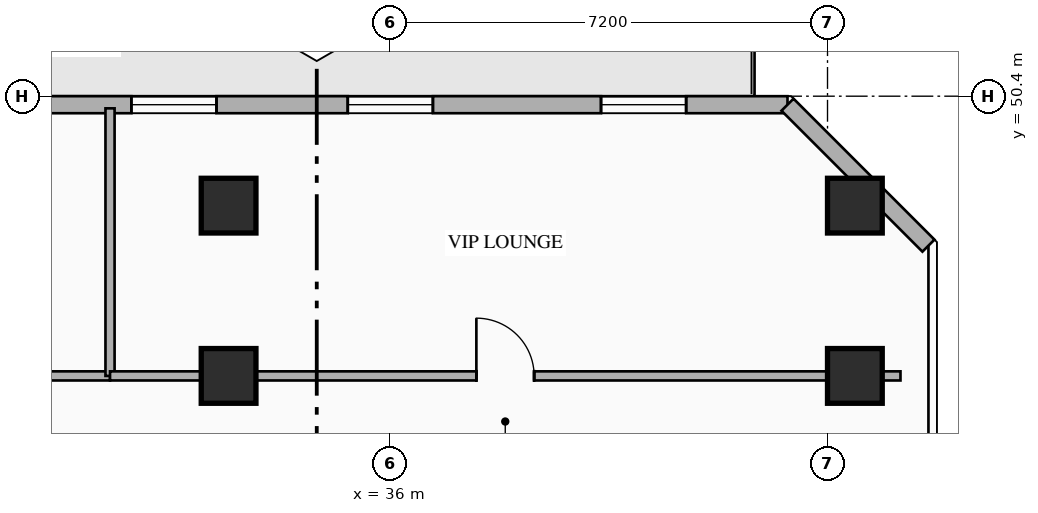
"""IFC4 building model, lengths in metres.
Left out: names, types, materials, properties, quantities, classifications, styles, units other than length and angle.
Written with IfcOpenShell. Run it as: python <this file> out.ifc"""

import sys

from ifc_helpers import new_model, si_unit, direction, frame, frame_2d, origin, origin_2d, place, context, subcontext, project, spatial, rectangle, hollow_rectangle, extrude, element, fill, save


model = new_model("IFC4")
c1 = context("Model", 3, precision=1e-05, world=origin(), true_north=direction((0.0, 1.0)))
c2 = subcontext(c1, "Body", "Model", "MODEL_VIEW")
j1 = project(units=[si_unit("LENGTHUNIT", "METRE"), si_unit("PLANEANGLEUNIT", "RADIAN")], contexts=[c1])
p1 = place(None, origin())
s1 = spatial("IfcSite", under=j1, at=p1, CompositionType="ELEMENT")
p2 = place(p1, origin())
s2 = spatial("IfcBuilding", under=s1, at=p2, CompositionType="ELEMENT")
p3 = place(p2, frame((0.0, 0.0, 70.1)))
s3 = spatial("IfcBuildingStorey", under=s2, at=p3, CompositionType="ELEMENT", Elevation=70.1)
for number, where, z_axis, x_axis in (
    (1, (33.35, 45.8, 0.0), (0.0, 0.0, 1.0), (1.0, 0.0, 0.0)),
    (2, (43.65, 45.8, 0.0), (0.0, 0.0, 1.0), (1.0, 0.0, 0.0)),
    (3, (33.35, 48.6, 0.0), (0.0, 0.0, 1.0), (1.0, 0.0, 0.0)),
    (4, (43.65, 48.6, 0.0), (0.0, 0.0, 1.0), (1.0, 0.0, 0.0)),
):
    element("IfcColumn", number, at=place(p3, frame(where, z_axis=z_axis, x_axis=x_axis)), inside=s3, PredefinedType="COLUMN", context=c2, shape_type="SweptSolid", body=[
        extrude(hollow_rectangle(XDim=0.9, YDim=0.9, WallThickness=0.036, at=origin_2d()), origin(), (0.0, 0.0, 1.0), 4.5),
    ])
p4 = place(p3, frame((12.058, 50.26, 0.0), z_axis=(0.0, 0.0, 1.0), x_axis=(1.0, 0.0, 0.0)))
e5 = element("IfcWall", 5, at=p4, inside=s3, PredefinedType="STANDARD", context=c2, shape_type="SweptSolid", body=[
    extrude(rectangle(XDim=30.484, YDim=0.28, at=frame_2d((15.242, 0.0))), origin(), (0.0, 0.0, 1.0), 4.28),
])
p5 = place(p4, frame((14.992, 0.0, 0.0)))
e6 = element("IfcOpeningElement", 6, at=p5, cuts=e5, PredefinedType="OPENING", context=c2, shape_type="SweptSolid", body=[
    extrude(rectangle(XDim=1.1, YDim=2.2, at=frame_2d((0.55, 1.1))), frame((0.0, 0.15, 0.0), z_axis=(0.0, -1.0, 0.0), x_axis=(1.0, 0.0, 0.0)), (0.0, 0.0, 1.0), 0.3),
])
p6 = place(p4, frame((0.46, 0.0, 0.85)))
e7 = element("IfcOpeningElement", 7, at=p6, cuts=e5, PredefinedType="OPENING", context=c2, shape_type="SweptSolid", body=[
    extrude(rectangle(XDim=1.4, YDim=1.8, at=frame_2d((0.7, 0.9))), frame((0.0, 0.15, 0.0), z_axis=(0.0, -1.0, 0.0), x_axis=(1.0, 0.0, 0.0)), (0.0, 0.0, 1.0), 0.3),
])
p7 = place(p4, frame((4.435, 0.0, 0.85)))
e8 = element("IfcOpeningElement", 8, at=p7, cuts=e5, PredefinedType="OPENING", context=c2, shape_type="SweptSolid", body=[
    extrude(rectangle(XDim=1.4, YDim=1.8, at=frame_2d((0.7, 0.9))), frame((0.0, 0.15, 0.0), z_axis=(0.0, -1.0, 0.0), x_axis=(1.0, 0.0, 0.0)), (0.0, 0.0, 1.0), 0.3),
])
p8 = place(p4, frame((11.361, 0.0, 0.85)))
e9 = element("IfcOpeningElement", 9, at=p8, cuts=e5, PredefinedType="OPENING", context=c2, shape_type="SweptSolid", body=[
    extrude(rectangle(XDim=1.4, YDim=1.8, at=frame_2d((0.7, 0.9))), frame((0.0, 0.15, 0.0), z_axis=(0.0, -1.0, 0.0), x_axis=(1.0, 0.0, 0.0)), (0.0, 0.0, 1.0), 0.3),
])
p9 = place(p4, frame((19.693, 0.0, 0.85)))
e10 = element("IfcOpeningElement", 10, at=p9, cuts=e5, PredefinedType="OPENING", context=c2, shape_type="SweptSolid", body=[
    extrude(rectangle(XDim=1.4, YDim=1.8, at=frame_2d((0.7, 0.9))), frame((0.0, 0.15, 0.0), z_axis=(0.0, -1.0, 0.0), x_axis=(1.0, 0.0, 0.0)), (0.0, 0.0, 1.0), 0.3),
])
p10 = place(p4, frame((23.252, 0.0, 0.85)))
e11 = element("IfcOpeningElement", 11, at=p10, cuts=e5, PredefinedType="OPENING", context=c2, shape_type="SweptSolid", body=[
    extrude(rectangle(XDim=1.4, YDim=1.8, at=frame_2d((0.7, 0.9))), frame((0.0, 0.15, 0.0), z_axis=(0.0, -1.0, 0.0), x_axis=(1.0, 0.0, 0.0)), (0.0, 0.0, 1.0), 0.3),
])
p11 = place(p4, frame((27.417, 0.0, 0.85)))
e12 = element("IfcOpeningElement", 12, at=p11, cuts=e5, PredefinedType="OPENING", context=c2, shape_type="SweptSolid", body=[
    extrude(rectangle(XDim=1.4, YDim=1.8, at=frame_2d((0.7, 0.9))), frame((0.0, 0.15, 0.0), z_axis=(0.0, -1.0, 0.0), x_axis=(1.0, 0.0, 0.0)), (0.0, 0.0, 1.0), 0.3),
])
p12 = place(p3, frame((42.542, 50.26, 0.0), z_axis=(0.0, 0.0, 1.0), x_axis=(0.707106781187, -0.707106781187, 0.0)))
e13 = element("IfcWall", 13, at=p12, inside=s3, PredefinedType="STANDARD", context=c2, shape_type="SweptSolid", body=[
    extrude(rectangle(XDim=3.278, YDim=0.28, at=frame_2d((1.639, 0.0))), origin(), (0.0, 0.0, 1.0), 4.28),
])
p13 = place(p3, frame((22.2, 45.8, 0.0), z_axis=(0.0, 0.0, 1.0), x_axis=(1.0, 0.0, 0.0)))
e14 = element("IfcWall", 14, at=p13, inside=s3, PredefinedType="PARTITIONING", context=c2, shape_type="SweptSolid", body=[
    extrude(rectangle(XDim=9.2, YDim=0.15, at=frame_2d((4.6, 0.0))), origin(), (0.0, 0.0, 1.0), 3.475),
])
p14 = place(p13, frame((5.248, 0.0, 0.0)))
e15 = element("IfcOpeningElement", 15, at=p14, cuts=e14, PredefinedType="OPENING", context=c2, shape_type="SweptSolid", body=[
    extrude(rectangle(XDim=0.95, YDim=2.15, at=frame_2d((0.475, 1.075))), frame((0.0, 0.085, 0.0), z_axis=(0.0, -1.0, 0.0), x_axis=(1.0, 0.0, 0.0)), (0.0, 0.0, 1.0), 0.17),
])
p15 = place(p3, frame((31.4, 45.8, 0.0), z_axis=(0.0, 0.0, 1.0), x_axis=(0.0, 1.0, 0.0)))
e16 = element("IfcWall", 16, at=p15, inside=s3, PredefinedType="PARTITIONING", context=c2, shape_type="SweptSolid", body=[
    extrude(rectangle(XDim=4.4, YDim=0.15, at=frame_2d((2.2, 0.0))), origin(), (0.0, 0.0, 1.0), 4.28),
])
p16 = place(p3, frame((31.4, 45.8, 0.0), z_axis=(0.0, 0.0, 1.0), x_axis=(1.0, 0.0, 0.0)))
e17 = element("IfcWall", 17, at=p16, inside=s3, PredefinedType="PARTITIONING", context=c2, shape_type="SweptSolid", body=[
    extrude(rectangle(XDim=13.0, YDim=0.15, at=frame_2d((6.5, 0.0))), origin(), (0.0, 0.0, 1.0), 3.475),
])
p17 = place(p16, frame((6.025, 0.0, 0.0)))
e18 = element("IfcOpeningElement", 18, at=p17, cuts=e17, PredefinedType="OPENING", context=c2, shape_type="SweptSolid", body=[
    extrude(rectangle(XDim=0.95, YDim=2.15, at=frame_2d((0.475, 1.075))), frame((0.0, 0.085, 0.0), z_axis=(0.0, -1.0, 0.0), x_axis=(1.0, 0.0, 0.0)), (0.0, 0.0, 1.0), 0.17),
])
p18 = place(p9, origin())
e19 = element("IfcWindow", 19, at=p18, inside=s3, PartitioningType="SINGLE_PANEL", PredefinedType="WINDOW", context=c2, shape_type="SweptSolid", body=[
    extrude(rectangle(XDim=1.4, YDim=1.8, at=frame_2d((0.7, 0.9))), frame((0.0, 0.03, 0.0), z_axis=(0.0, -1.0, 0.0), x_axis=(1.0, 0.0, 0.0)), (0.0, 0.0, 1.0), 0.06),
])
fill(e10, e19)
p19 = place(p10, origin())
e20 = element("IfcWindow", 20, at=p19, inside=s3, PartitioningType="SINGLE_PANEL", PredefinedType="WINDOW", context=c2, shape_type="SweptSolid", body=[
    extrude(rectangle(XDim=1.4, YDim=1.8, at=frame_2d((0.7, 0.9))), frame((0.0, 0.03, 0.0), z_axis=(0.0, -1.0, 0.0), x_axis=(1.0, 0.0, 0.0)), (0.0, 0.0, 1.0), 0.06),
])
fill(e11, e20)
p20 = place(p11, origin())
e21 = element("IfcWindow", 21, at=p20, inside=s3, PartitioningType="SINGLE_PANEL", PredefinedType="WINDOW", context=c2, shape_type="SweptSolid", body=[
    extrude(rectangle(XDim=1.4, YDim=1.8, at=frame_2d((0.7, 0.9))), frame((0.0, 0.03, 0.0), z_axis=(0.0, -1.0, 0.0), x_axis=(1.0, 0.0, 0.0)), (0.0, 0.0, 1.0), 0.06),
])
fill(e12, e21)
p21 = place(p17, origin())
e22 = element("IfcDoor", 22, at=p21, inside=s3, OperationType="SINGLE_SWING_LEFT", PredefinedType="DOOR", context=c2, shape_type="SweptSolid", body=[
    extrude(rectangle(XDim=0.95, YDim=2.15, at=frame_2d((0.475, 1.075))), frame((0.0, 0.025, 0.0), z_axis=(0.0, -1.0, 0.0), x_axis=(1.0, 0.0, 0.0)), (0.0, 0.0, 1.0), 0.05),
])
fill(e18, e22)
save(model, sys.argv[1])
